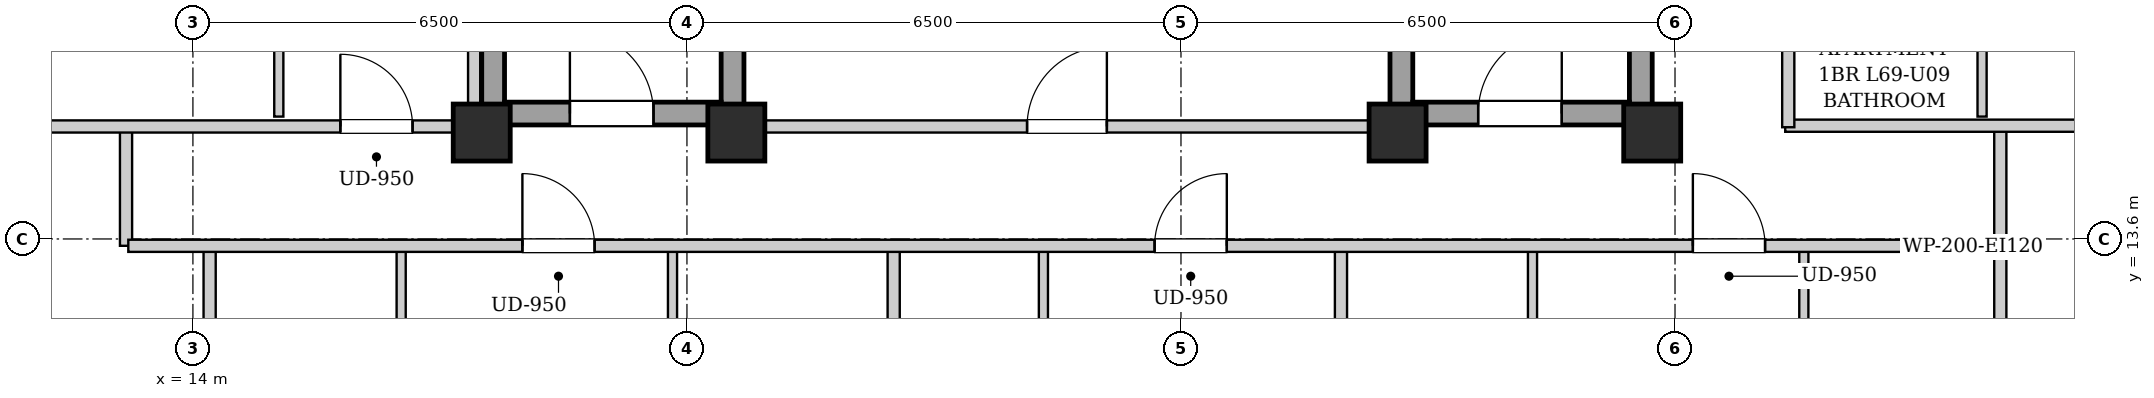
"""IFC4 building model, lengths in metres.
Left out: names, types, materials, properties, quantities, classifications, styles, units other than length and angle.
Written with IfcOpenShell. Run it as: python <this file> out.ifc"""

import sys

from ifc_helpers import new_model, si_unit, direction, frame, frame_2d, origin, origin_2d, place, context, subcontext, project, spatial, rectangle, extrude, element, fill, save


model = new_model("IFC4")
c1 = context("Model", 3, precision=1e-05, world=origin(), true_north=direction((0.0, 1.0)))
c2 = subcontext(c1, "Body", "Model", "MODEL_VIEW")
j1 = project(units=[si_unit("LENGTHUNIT", "METRE"), si_unit("PLANEANGLEUNIT", "RADIAN")], contexts=[c1])
p1 = place(None, origin())
s1 = spatial("IfcSite", under=j1, at=p1, CompositionType="ELEMENT")
p2 = place(p1, origin())
s2 = spatial("IfcBuilding", under=s1, at=p2, CompositionType="ELEMENT")
p3 = place(p2, frame((0.0, 0.0, 237.7)))
s3 = spatial("IfcBuildingStorey", under=s2, at=p3, CompositionType="ELEMENT", Elevation=237.7)
for number, where, z_axis, x_axis in (
    (1, (17.8, 15.0, 0.0), (0.0, 0.0, 1.0), (1.0, 0.0, 0.0)),
    (2, (21.15, 15.0, 0.0), (0.0, 0.0, 1.0), (1.0, 0.0, 0.0)),
    (3, (29.85, 15.0, 0.0), (0.0, 0.0, 1.0), (1.0, 0.0, 0.0)),
    (4, (33.2, 15.0, 0.0), (0.0, 0.0, 1.0), (1.0, 0.0, 0.0)),
):
    element("IfcColumn", number, at=place(p3, frame(where, z_axis=z_axis, x_axis=x_axis)), inside=s3, PredefinedType="COLUMN", context=c2, shape_type="SweptSolid", body=[
        extrude(rectangle(XDim=0.75, YDim=0.75, at=origin_2d()), origin(), (0.0, 0.0, 1.0), 3.4),
    ])
for number, where, z_axis, x_axis in (
    (5, (17.95, 15.1, 0.0), (0.0, 0.0, 1.0), (0.0, 1.0, 0.0)),
    (6, (21.1, 15.1, 0.0), (0.0, 0.0, 1.0), (0.0, 1.0, 0.0)),
):
    element("IfcWall", number, at=place(p3, frame(where, z_axis=z_axis, x_axis=x_axis)), inside=s3, PredefinedType="SHEAR", context=c2, shape_type="SweptSolid", body=[
        extrude(rectangle(XDim=9.0, YDim=0.3, at=frame_2d((4.5, 0.0))), origin(), (0.0, 0.0, 1.0), 3.14),
    ])
p4 = place(p3, frame((18.1, 15.25, 0.0), z_axis=(0.0, 0.0, 1.0), x_axis=(1.0, 0.0, 0.0)))
e7 = element("IfcWall", 7, at=p4, inside=s3, PredefinedType="SHEAR", context=c2, shape_type="SweptSolid", body=[
    extrude(rectangle(XDim=2.85, YDim=0.3, at=frame_2d((1.425, 0.0))), origin(), (0.0, 0.0, 1.0), 3.14),
])
p5 = place(p4, frame((0.86, 0.0, 0.0)))
e8 = element("IfcOpeningElement", 8, at=p5, cuts=e7, PredefinedType="OPENING", context=c2, shape_type="SweptSolid", body=[
    extrude(rectangle(XDim=1.1, YDim=2.05, at=frame_2d((0.55, 1.025))), frame((0.0, 0.16, 0.0), z_axis=(0.0, -1.0, 0.0), x_axis=(1.0, 0.0, 0.0)), (0.0, 0.0, 1.0), 0.32),
])
for number, where, z_axis, x_axis in (
    (9, (29.9, 15.1, 0.0), (0.0, 0.0, 1.0), (0.0, 1.0, 0.0)),
    (10, (33.05, 15.1, 0.0), (0.0, 0.0, 1.0), (0.0, 1.0, 0.0)),
):
    element("IfcWall", number, at=place(p3, frame(where, z_axis=z_axis, x_axis=x_axis)), inside=s3, PredefinedType="SHEAR", context=c2, shape_type="SweptSolid", body=[
        extrude(rectangle(XDim=9.0, YDim=0.3, at=frame_2d((4.5, 0.0))), origin(), (0.0, 0.0, 1.0), 3.14),
    ])
p6 = place(p3, frame((30.05, 15.25, 0.0), z_axis=(0.0, 0.0, 1.0), x_axis=(1.0, 0.0, 0.0)))
e11 = element("IfcWall", 11, at=p6, inside=s3, PredefinedType="SHEAR", context=c2, shape_type="SweptSolid", body=[
    extrude(rectangle(XDim=2.85, YDim=0.3, at=frame_2d((1.425, 0.0))), origin(), (0.0, 0.0, 1.0), 3.14),
])
p7 = place(p6, frame((0.86, 0.0, 0.0)))
e12 = element("IfcOpeningElement", 12, at=p7, cuts=e11, PredefinedType="OPENING", context=c2, shape_type="SweptSolid", body=[
    extrude(rectangle(XDim=1.1, YDim=2.05, at=frame_2d((0.55, 1.025))), frame((0.0, 0.16, 0.0), z_axis=(0.0, -1.0, 0.0), x_axis=(1.0, 0.0, 0.0)), (0.0, 0.0, 1.0), 0.32),
])
p8 = place(p3, frame((21.25, 15.08, 0.0), z_axis=(0.0, 0.0, 1.0), x_axis=(1.0, 0.0, 0.0)))
e13 = element("IfcWall", 13, at=p8, inside=s3, PredefinedType="PARTITIONING", context=c2, shape_type="SweptSolid", body=[
    extrude(rectangle(XDim=8.5, YDim=0.16, at=frame_2d((4.25, 0.0))), origin(), (0.0, 0.0, 1.0), 2.668),
])
p9 = place(p8, frame((3.725, 0.0, 0.0)))
e14 = element("IfcOpeningElement", 14, at=p9, cuts=e13, PredefinedType="OPENING", context=c2, shape_type="SweptSolid", body=[
    extrude(rectangle(XDim=1.05, YDim=2.05, at=frame_2d((0.525, 1.025))), frame((0.0, 0.09, 0.0), z_axis=(0.0, -1.0, 0.0), x_axis=(1.0, 0.0, 0.0)), (0.0, 0.0, 1.0), 0.18),
])
for number, where, z_axis, x_axis in (
    (15, (13.12, 13.51, 0.0), (0.0, 0.0, 1.0), (0.0, 1.0, 0.0)),
    (16, (37.78, 13.51, 0.0), (0.0, 0.0, 1.0), (0.0, 1.0, 0.0)),
):
    element("IfcWall", number, at=place(p3, frame(where, z_axis=z_axis, x_axis=x_axis)), inside=s3, PredefinedType="PARTITIONING", context=c2, shape_type="SweptSolid", body=[
        extrude(rectangle(XDim=1.58, YDim=0.16, at=frame_2d((0.79, 0.0))), origin(), (0.0, 0.0, 1.0), 3.14),
    ])
p10 = place(p3, frame((34.95, 15.09, 0.0), z_axis=(0.0, 0.0, 1.0), x_axis=(1.0, 0.0, 0.0)))
e17 = element("IfcWall", 17, at=p10, inside=s3, PredefinedType="PARTITIONING", context=c2, shape_type="SweptSolid", body=[
    extrude(rectangle(XDim=5.07, YDim=0.16, at=frame_2d((2.535, 0.0))), origin(), (0.0, 0.0, 1.0), 2.668),
])
p11 = place(p3, frame((14.22, 4.08, 0.0), z_axis=(0.0, 0.0, 1.0), x_axis=(0.0, 1.0, 0.0)))
e18 = element("IfcWall", 18, at=p11, inside=s3, PredefinedType="PARTITIONING", context=c2, shape_type="SweptSolid", body=[
    extrude(rectangle(XDim=9.39, YDim=0.16, at=frame_2d((4.695, 0.0))), origin(), (0.0, 0.0, 1.0), 3.14),
])
p12 = place(p3, frame((16.74, 10.62, 0.0), z_axis=(0.0, 0.0, 1.0), x_axis=(0.0, 1.0, 0.0)))
e19 = element("IfcWall", 19, at=p12, inside=s3, PredefinedType="PARTITIONING", context=c2, shape_type="SweptSolid", body=[
    extrude(rectangle(XDim=2.85, YDim=0.12, at=frame_2d((1.425, 0.0))), origin(), (0.0, 0.0, 1.0), 3.14),
])
p13 = place(p12, frame((0.995, 0.0, 0.0)))
e20 = element("IfcOpeningElement", 20, at=p13, cuts=e19, PredefinedType="OPENING", context=c2, shape_type="SweptSolid", body=[
    extrude(rectangle(XDim=0.86, YDim=2.05, at=frame_2d((0.43, 1.025))), frame((0.0, 0.07, 0.0), z_axis=(0.0, -1.0, 0.0), x_axis=(1.0, 0.0, 0.0)), (0.0, 0.0, 1.0), 0.14),
])
p14 = place(p3, frame((20.31, 10.62, 0.0), z_axis=(0.0, 0.0, 1.0), x_axis=(0.0, 1.0, 0.0)))
e21 = element("IfcWall", 21, at=p14, inside=s3, PredefinedType="PARTITIONING", context=c2, shape_type="SweptSolid", body=[
    extrude(rectangle(XDim=2.85, YDim=0.12, at=frame_2d((1.425, 0.0))), origin(), (0.0, 0.0, 1.0), 3.14),
])
p15 = place(p14, frame((0.975, 0.0, 0.0)))
e22 = element("IfcOpeningElement", 22, at=p15, cuts=e21, PredefinedType="OPENING", context=c2, shape_type="SweptSolid", body=[
    extrude(rectangle(XDim=0.9, YDim=2.05, at=frame_2d((0.45, 1.025))), frame((0.0, 0.07, 0.0), z_axis=(0.0, -1.0, 0.0), x_axis=(1.0, 0.0, 0.0)), (0.0, 0.0, 1.0), 0.14),
])
p16 = place(p3, frame((23.22, 4.08, 0.0), z_axis=(0.0, 0.0, 1.0), x_axis=(0.0, 1.0, 0.0)))
e23 = element("IfcWall", 23, at=p16, inside=s3, PredefinedType="PARTITIONING", context=c2, shape_type="SweptSolid", body=[
    extrude(rectangle(XDim=9.39, YDim=0.16, at=frame_2d((4.695, 0.0))), origin(), (0.0, 0.0, 1.0), 3.14),
])
p17 = place(p3, frame((25.19, 10.62, 0.0), z_axis=(0.0, 0.0, 1.0), x_axis=(0.0, 1.0, 0.0)))
e24 = element("IfcWall", 24, at=p17, inside=s3, PredefinedType="PARTITIONING", context=c2, shape_type="SweptSolid", body=[
    extrude(rectangle(XDim=2.85, YDim=0.12, at=frame_2d((1.425, 0.0))), origin(), (0.0, 0.0, 1.0), 3.14),
])
p18 = place(p17, frame((0.995, 0.0, 0.0)))
e25 = element("IfcOpeningElement", 25, at=p18, cuts=e24, PredefinedType="OPENING", context=c2, shape_type="SweptSolid", body=[
    extrude(rectangle(XDim=0.86, YDim=2.05, at=frame_2d((0.43, 1.025))), frame((0.0, 0.07, 0.0), z_axis=(0.0, -1.0, 0.0), x_axis=(1.0, 0.0, 0.0)), (0.0, 0.0, 1.0), 0.14),
])
p19 = place(p3, frame((37.78, 10.56, 0.0), z_axis=(0.0, 0.0, 1.0), x_axis=(0.0, 1.0, 0.0)))
e26 = element("IfcWall", 26, at=p19, inside=s3, PredefinedType="PARTITIONING", context=c2, shape_type="SweptSolid", body=[
    extrude(rectangle(XDim=2.91, YDim=0.16, at=frame_2d((1.455, 0.0))), origin(), (0.0, 0.0, 1.0), 3.14),
])
p20 = place(p3, frame((29.105, 4.08, 0.0), z_axis=(0.0, 0.0, 1.0), x_axis=(0.0, 1.0, 0.0)))
e27 = element("IfcWall", 27, at=p20, inside=s3, PredefinedType="PARTITIONING", context=c2, shape_type="SweptSolid", body=[
    extrude(rectangle(XDim=9.39, YDim=0.16, at=frame_2d((4.695, 0.0))), origin(), (0.0, 0.0, 1.0), 3.14),
])
p21 = place(p3, frame((31.625, 10.62, 0.0), z_axis=(0.0, 0.0, 1.0), x_axis=(0.0, 1.0, 0.0)))
e28 = element("IfcWall", 28, at=p21, inside=s3, PredefinedType="PARTITIONING", context=c2, shape_type="SweptSolid", body=[
    extrude(rectangle(XDim=2.85, YDim=0.12, at=frame_2d((1.425, 0.0))), origin(), (0.0, 0.0, 1.0), 3.14),
])
p22 = place(p21, frame((0.995, 0.0, 0.0)))
e29 = element("IfcOpeningElement", 29, at=p22, cuts=e28, PredefinedType="OPENING", context=c2, shape_type="SweptSolid", body=[
    extrude(rectangle(XDim=0.86, YDim=2.05, at=frame_2d((0.43, 1.025))), frame((0.0, 0.07, 0.0), z_axis=(0.0, -1.0, 0.0), x_axis=(1.0, 0.0, 0.0)), (0.0, 0.0, 1.0), 0.14),
])
p23 = place(p3, frame((35.195, 10.62, 0.0), z_axis=(0.0, 0.0, 1.0), x_axis=(0.0, 1.0, 0.0)))
e30 = element("IfcWall", 30, at=p23, inside=s3, PredefinedType="PARTITIONING", context=c2, shape_type="SweptSolid", body=[
    extrude(rectangle(XDim=2.85, YDim=0.12, at=frame_2d((1.425, 0.0))), origin(), (0.0, 0.0, 1.0), 3.14),
])
p24 = place(p23, frame((0.975, 0.0, 0.0)))
e31 = element("IfcOpeningElement", 31, at=p24, cuts=e30, PredefinedType="OPENING", context=c2, shape_type="SweptSolid", body=[
    extrude(rectangle(XDim=0.9, YDim=2.05, at=frame_2d((0.45, 1.025))), frame((0.0, 0.07, 0.0), z_axis=(0.0, -1.0, 0.0), x_axis=(1.0, 0.0, 0.0)), (0.0, 0.0, 1.0), 0.14),
])
p25 = place(p3, frame((10.88, 15.08, 0.0), z_axis=(0.0, 0.0, 1.0), x_axis=(1.0, 0.0, 0.0)))
e32 = element("IfcWall", 32, at=p25, inside=s3, PredefinedType="PARTITIONING", context=c2, shape_type="SweptSolid", body=[
    extrude(rectangle(XDim=6.88, YDim=0.16, at=frame_2d((3.44, 0.0))), origin(), (0.0, 0.0, 1.0), 2.668),
])
p26 = place(p25, frame((5.06, 0.0, 0.0)))
e33 = element("IfcOpeningElement", 33, at=p26, cuts=e32, PredefinedType="OPENING", context=c2, shape_type="SweptSolid", body=[
    extrude(rectangle(XDim=0.95, YDim=2.1, at=frame_2d((0.475, 1.05))), frame((0.0, 0.09, 0.0), z_axis=(0.0, -1.0, 0.0), x_axis=(1.0, 0.0, 0.0)), (0.0, 0.0, 1.0), 0.18),
])
p27 = place(p3, frame((15.13, 15.21, 0.0), z_axis=(0.0, 0.0, 1.0), x_axis=(0.0, 1.0, 0.0)))
e34 = element("IfcWall", 34, at=p27, inside=s3, PredefinedType="PARTITIONING", context=c2, shape_type="SweptSolid", body=[
    extrude(rectangle(XDim=4.5, YDim=0.12, at=frame_2d((2.25, 0.0))), origin(), (0.0, 0.0, 1.0), 3.14),
])
p28 = place(p27, frame((1.8, 0.0, 0.0)))
e35 = element("IfcOpeningElement", 35, at=p28, cuts=e34, PredefinedType="OPENING", context=c2, shape_type="SweptSolid", body=[
    extrude(rectangle(XDim=0.9, YDim=2.05, at=frame_2d((0.45, 1.025))), frame((0.0, 0.07, 0.0), z_axis=(0.0, -1.0, 0.0), x_axis=(1.0, 0.0, 0.0)), (0.0, 0.0, 1.0), 0.14),
])
p29 = place(p3, frame((37.54, 15.21, 0.0), z_axis=(0.0, 0.0, 1.0), x_axis=(0.0, 1.0, 0.0)))
e36 = element("IfcWall", 36, at=p29, inside=s3, PredefinedType="PARTITIONING", context=c2, shape_type="SweptSolid", body=[
    extrude(rectangle(XDim=2.159, YDim=0.12, at=frame_2d((1.08, 0.0))), origin(), (0.0, 0.0, 1.0), 3.14),
])
p30 = place(p3, frame((13.15, 13.51, 0.0), z_axis=(0.0, 0.0, 1.0), x_axis=(1.0, 0.0, 0.0)))
e37 = element("IfcWall", 37, at=p30, inside=s3, PredefinedType="PARTITIONING", context=c2, shape_type="SweptSolid", body=[
    extrude(rectangle(XDim=24.6, YDim=0.16, at=frame_2d((12.3, 0.0))), origin(), (0.0, 0.0, 1.0), 3.14),
])
p31 = place(p30, frame((5.185, 0.0, 0.0)))
e38 = element("IfcOpeningElement", 38, at=p31, cuts=e37, PredefinedType="OPENING", context=c2, shape_type="SweptSolid", body=[
    extrude(rectangle(XDim=0.95, YDim=2.1, at=frame_2d((0.475, 1.05))), frame((0.0, 0.09, 0.0), z_axis=(0.0, -1.0, 0.0), x_axis=(1.0, 0.0, 0.0)), (0.0, 0.0, 1.0), 0.18),
])
p32 = place(p30, frame((13.503, 0.0, 0.0)))
e39 = element("IfcOpeningElement", 39, at=p32, cuts=e37, PredefinedType="OPENING", context=c2, shape_type="SweptSolid", body=[
    extrude(rectangle(XDim=0.95, YDim=2.1, at=frame_2d((0.475, 1.05))), frame((0.0, 0.09, 0.0), z_axis=(0.0, -1.0, 0.0), x_axis=(1.0, 0.0, 0.0)), (0.0, 0.0, 1.0), 0.18),
])
p33 = place(p30, frame((20.585, 0.0, 0.0)))
e40 = element("IfcOpeningElement", 40, at=p33, cuts=e37, PredefinedType="OPENING", context=c2, shape_type="SweptSolid", body=[
    extrude(rectangle(XDim=0.95, YDim=2.1, at=frame_2d((0.475, 1.05))), frame((0.0, 0.09, 0.0), z_axis=(0.0, -1.0, 0.0), x_axis=(1.0, 0.0, 0.0)), (0.0, 0.0, 1.0), 0.18),
])
p34 = place(p3, frame((17.7, 15.02, 0.0), z_axis=(0.0, 0.0, 1.0), x_axis=(0.0, 1.0, 0.0)))
e41 = element("IfcWall", 41, at=p34, inside=s3, PredefinedType="PARTITIONING", context=c2, shape_type="SweptSolid", body=[
    extrude(rectangle(XDim=13.98, YDim=0.16, at=frame_2d((6.99, 0.0))), origin(), (0.0, 0.0, 1.0), 2.475),
])
p35 = place(p3, frame((34.99, 15.07, 0.0), z_axis=(0.0, 0.0, 1.0), x_axis=(0.0, 1.0, 0.0)))
e42 = element("IfcWall", 42, at=p35, inside=s3, PredefinedType="PARTITIONING", context=c2, shape_type="SweptSolid", body=[
    extrude(rectangle(XDim=13.93, YDim=0.16, at=frame_2d((6.965, 0.0))), origin(), (0.0, 0.0, 1.0), 3.14),
])
p36 = place(p35, frame((4.661, 0.0, 0.0)))
e43 = element("IfcOpeningElement", 43, at=p36, cuts=e42, PredefinedType="OPENING", context=c2, shape_type="SweptSolid", body=[
    extrude(rectangle(XDim=0.95, YDim=2.1, at=frame_2d((0.475, 1.05))), frame((0.0, 0.09, 0.0), z_axis=(0.0, -1.0, 0.0), x_axis=(1.0, 0.0, 0.0)), (0.0, 0.0, 1.0), 0.18),
])
p37 = place(p35, frame((11.411, 0.0, 0.0)))
e44 = element("IfcOpeningElement", 44, at=p37, cuts=e42, PredefinedType="OPENING", context=c2, shape_type="SweptSolid", body=[
    extrude(rectangle(XDim=0.95, YDim=2.1, at=frame_2d((0.475, 1.05))), frame((0.0, 0.09, 0.0), z_axis=(0.0, -1.0, 0.0), x_axis=(1.0, 0.0, 0.0)), (0.0, 0.0, 1.0), 0.18),
])
p38 = place(p5, origin())
e45 = element("IfcDoor", 45, at=p38, inside=s3, OperationType="SINGLE_SWING_LEFT", PredefinedType="DOOR", context=c2, shape_type="SweptSolid", body=[
    extrude(rectangle(XDim=1.1, YDim=2.05, at=frame_2d((0.55, 1.025))), frame((0.0, 0.025, 0.0), z_axis=(0.0, -1.0, 0.0), x_axis=(1.0, 0.0, 0.0)), (0.0, 0.0, 1.0), 0.05),
])
fill(e8, e45)
p39 = place(p7, origin())
e46 = element("IfcDoor", 46, at=p39, inside=s3, OperationType="SINGLE_SWING_RIGHT", PredefinedType="DOOR", context=c2, shape_type="SweptSolid", body=[
    extrude(rectangle(XDim=1.1, YDim=2.05, at=frame_2d((0.55, 1.025))), frame((0.0, 0.025, 0.0), z_axis=(0.0, -1.0, 0.0), x_axis=(1.0, 0.0, 0.0)), (0.0, 0.0, 1.0), 0.05),
])
fill(e12, e46)
p40 = place(p9, origin())
e47 = element("IfcDoor", 47, at=p40, inside=s3, OperationType="SINGLE_SWING_RIGHT", PredefinedType="DOOR", context=c2, shape_type="SweptSolid", body=[
    extrude(rectangle(XDim=1.05, YDim=2.05, at=frame_2d((0.525, 1.025))), frame((0.0, 0.025, 0.0), z_axis=(0.0, -1.0, 0.0), x_axis=(1.0, 0.0, 0.0)), (0.0, 0.0, 1.0), 0.05),
])
fill(e14, e47)
p41 = place(p26, origin())
e48 = element("IfcDoor", 48, at=p41, inside=s3, OperationType="SINGLE_SWING_LEFT", PredefinedType="DOOR", context=c2, shape_type="SweptSolid", body=[
    extrude(rectangle(XDim=0.95, YDim=2.1, at=frame_2d((0.475, 1.05))), frame((0.0, 0.025, 0.0), z_axis=(0.0, -1.0, 0.0), x_axis=(1.0, 0.0, 0.0)), (0.0, 0.0, 1.0), 0.05),
])
fill(e33, e48)
p42 = place(p31, origin())
e49 = element("IfcDoor", 49, at=p42, inside=s3, OperationType="SINGLE_SWING_LEFT", PredefinedType="DOOR", context=c2, shape_type="SweptSolid", body=[
    extrude(rectangle(XDim=0.95, YDim=2.1, at=frame_2d((0.475, 1.05))), frame((0.0, 0.025, 0.0), z_axis=(0.0, -1.0, 0.0), x_axis=(1.0, 0.0, 0.0)), (0.0, 0.0, 1.0), 0.05),
])
fill(e38, e49)
p43 = place(p32, origin())
e50 = element("IfcDoor", 50, at=p43, inside=s3, OperationType="SINGLE_SWING_RIGHT", PredefinedType="DOOR", context=c2, shape_type="SweptSolid", body=[
    extrude(rectangle(XDim=0.95, YDim=2.1, at=frame_2d((0.475, 1.05))), frame((0.0, 0.025, 0.0), z_axis=(0.0, -1.0, 0.0), x_axis=(1.0, 0.0, 0.0)), (0.0, 0.0, 1.0), 0.05),
])
fill(e39, e50)
p44 = place(p33, origin())
e51 = element("IfcDoor", 51, at=p44, inside=s3, OperationType="SINGLE_SWING_LEFT", PredefinedType="DOOR", context=c2, shape_type="SweptSolid", body=[
    extrude(rectangle(XDim=0.95, YDim=2.1, at=frame_2d((0.475, 1.05))), frame((0.0, 0.025, 0.0), z_axis=(0.0, -1.0, 0.0), x_axis=(1.0, 0.0, 0.0)), (0.0, 0.0, 1.0), 0.05),
])
fill(e40, e51)
save(model, sys.argv[1])
